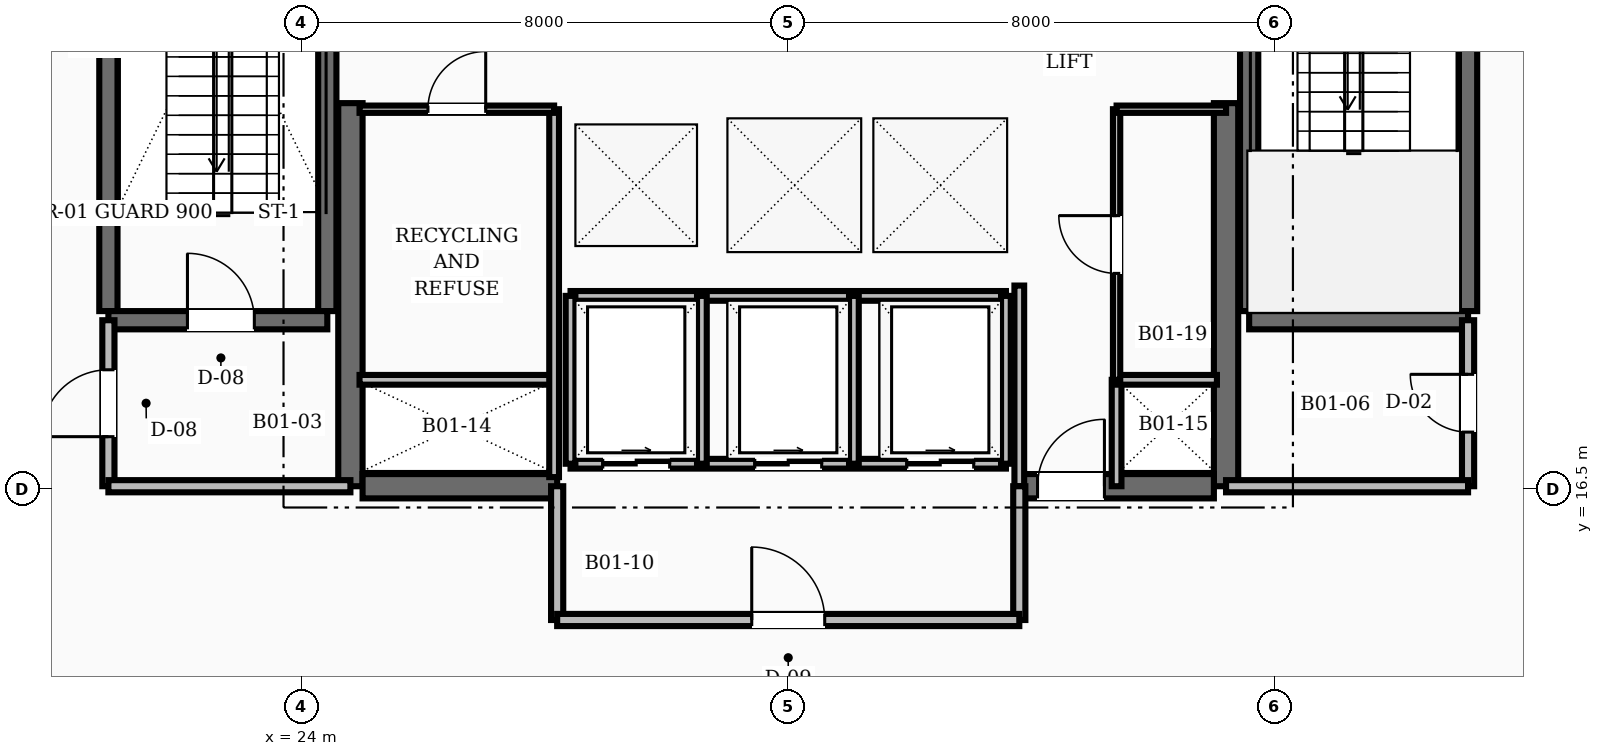
"""IFC4 building model, lengths in metres.
Left out: names, types, materials, properties, quantities, classifications, styles, units other than length and angle.
Written with IfcOpenShell. Run it as: python <this file> out.ifc"""

import sys

from ifc_helpers import new_model, si_unit, direction, frame, frame_2d, origin, place, context, subcontext, project, spatial, rectangle, extrude, element, fill, save


model = new_model("IFC4")
c1 = context("Model", 3, precision=1e-05, world=origin(), true_north=direction((0.0, 1.0)))
c2 = subcontext(c1, "Body", "Model", "MODEL_VIEW")
j1 = project(units=[si_unit("LENGTHUNIT", "METRE"), si_unit("PLANEANGLEUNIT", "RADIAN")], contexts=[c1])
p1 = place(None, origin())
s1 = spatial("IfcSite", under=j1, at=p1, CompositionType="ELEMENT")
p2 = place(p1, origin())
s2 = spatial("IfcBuilding", under=s1, at=p2, CompositionType="ELEMENT")
p3 = place(p2, frame((0.0, 0.0, -5.2)))
s3 = spatial("IfcBuildingStorey", under=s2, at=p3, CompositionType="ELEMENT", Elevation=-5.2)
for number, where, z_axis, x_axis in (
    (1, (24.8, 16.55, 0.0), (0.0, 0.0, 1.0), (0.0, 1.0, 0.0)),
    (2, (39.2, 16.55, 0.0), (0.0, 0.0, 1.0), (0.0, 1.0, 0.0)),
):
    element("IfcWall", number, at=place(p3, frame(where, z_axis=z_axis, x_axis=x_axis)), inside=s3, PredefinedType="SHEAR", context=c2, shape_type="SweptSolid", body=[
        extrude(rectangle(XDim=6.3, YDim=0.4, at=frame_2d((3.15, 0.0))), origin(), (0.0, 0.0, 1.0), 5.2),
    ])
p4 = place(p3, frame((25.0, 16.55, 0.0), z_axis=(0.0, 0.0, 1.0), x_axis=(1.0, 0.0, 0.0)))
e3 = element("IfcWall", 3, at=p4, inside=s3, PredefinedType="SHEAR", context=c2, shape_type="SweptSolid", body=[
    extrude(rectangle(XDim=3.2, YDim=0.4, at=frame_2d((1.6, 0.0))), origin(), (0.0, 0.0, 1.0), 5.2),
])
p5 = place(p3, frame((35.8, 16.55, 0.0), z_axis=(0.0, 0.0, 1.0), x_axis=(1.0, 0.0, 0.0)))
e4 = element("IfcWall", 4, at=p5, inside=s3, PredefinedType="SHEAR", context=c2, shape_type="SweptSolid", body=[
    extrude(rectangle(XDim=3.2, YDim=0.4, at=frame_2d((1.6, 0.0))), origin(), (0.0, 0.0, 1.0), 5.2),
])
p6 = place(p5, frame((0.3, 0.0, 0.0)))
e5 = element("IfcOpeningElement", 5, at=p6, cuts=e4, PredefinedType="OPENING", context=c2, shape_type="SweptSolid", body=[
    extrude(rectangle(XDim=1.1, YDim=2.1, at=frame_2d((0.55, 1.05))), frame((0.0, 0.21, 0.0), z_axis=(0.0, -1.0, 0.0), x_axis=(1.0, 0.0, 0.0)), (0.0, 0.0, 1.0), 0.42),
])
for number, where, z_axis, x_axis in (
    (6, (20.82, 19.43, 0.0), (0.0, 0.0, 1.0), (0.0, 1.0, 0.0)),
    (7, (24.42, 19.43, 0.0), (0.0, 0.0, 1.0), (0.0, 1.0, 0.0)),
):
    element("IfcWall", number, at=place(p3, frame(where, z_axis=z_axis, x_axis=x_axis)), inside=s3, PredefinedType="SHEAR", context=c2, shape_type="SweptSolid", body=[
        extrude(rectangle(XDim=8.74, YDim=0.3, at=frame_2d((4.37, 0.0))), origin(), (0.0, 0.0, 1.0), 5.2),
    ])
p7 = place(p3, frame((20.82, 19.28, 0.0), z_axis=(0.0, 0.0, 1.0), x_axis=(1.0, 0.0, 0.0)))
e8 = element("IfcWall", 8, at=p7, inside=s3, PredefinedType="SHEAR", context=c2, shape_type="SweptSolid", body=[
    extrude(rectangle(XDim=3.6, YDim=0.3, at=frame_2d((1.8, 0.0))), origin(), (0.0, 0.0, 1.0), 5.2),
])
p8 = place(p7, frame((1.3, 0.0, 0.0)))
e9 = element("IfcOpeningElement", 9, at=p8, cuts=e8, PredefinedType="OPENING", context=c2, shape_type="SweptSolid", body=[
    extrude(rectangle(XDim=1.1, YDim=2.1, at=frame_2d((0.55, 1.05))), frame((0.0, 0.16, 0.0), z_axis=(0.0, -1.0, 0.0), x_axis=(1.0, 0.0, 0.0)), (0.0, 0.0, 1.0), 0.32),
])
for number, where, z_axis, x_axis in (
    (10, (43.18, 19.43, 0.0), (0.0, 0.0, 1.0), (0.0, 1.0, 0.0)),
    (11, (39.58, 19.43, 0.0), (0.0, 0.0, 1.0), (0.0, 1.0, 0.0)),
):
    element("IfcWall", number, at=place(p3, frame(where, z_axis=z_axis, x_axis=x_axis)), inside=s3, PredefinedType="SHEAR", context=c2, shape_type="SweptSolid", body=[
        extrude(rectangle(XDim=8.74, YDim=0.3, at=frame_2d((4.37, 0.0))), origin(), (0.0, 0.0, 1.0), 5.2),
    ])
p9 = place(p3, frame((39.58, 19.28, 0.0), z_axis=(0.0, 0.0, 1.0), x_axis=(1.0, 0.0, 0.0)))
e12 = element("IfcWall", 12, at=p9, inside=s3, PredefinedType="SHEAR", context=c2, shape_type="SweptSolid", body=[
    extrude(rectangle(XDim=3.6, YDim=0.3, at=frame_2d((1.8, 0.0))), origin(), (0.0, 0.0, 1.0), 5.2),
])
p10 = place(p3, frame((20.82, 16.55, 0.0), z_axis=(0.0, 0.0, 1.0), x_axis=(0.0, 1.0, 0.0)))
e13 = element("IfcWall", 13, at=p10, inside=s3, PredefinedType="SOLIDWALL", context=c2, shape_type="SweptSolid", body=[
    extrude(rectangle(XDim=2.73, YDim=0.2, at=frame_2d((1.365, 0.0))), origin(), (0.0, 0.0, 1.0), 3.92),
])
p11 = place(p10, frame((0.815, 0.0, 0.0)))
e14 = element("IfcOpeningElement", 14, at=p11, cuts=e13, PredefinedType="OPENING", context=c2, shape_type="SweptSolid", body=[
    extrude(rectangle(XDim=1.1, YDim=2.1, at=frame_2d((0.55, 1.05))), frame((0.0, 0.11, 0.0), z_axis=(0.0, -1.0, 0.0), x_axis=(1.0, 0.0, 0.0)), (0.0, 0.0, 1.0), 0.22),
])
p12 = place(p3, frame((20.82, 16.55, 0.0), z_axis=(0.0, 0.0, 1.0), x_axis=(1.0, 0.0, 0.0)))
e15 = element("IfcWall", 15, at=p12, inside=s3, PredefinedType="SOLIDWALL", context=c2, shape_type="SweptSolid", body=[
    extrude(rectangle(XDim=3.98, YDim=0.2, at=frame_2d((1.99, 0.0))), origin(), (0.0, 0.0, 1.0), 3.92),
])
p13 = place(p3, frame((43.18, 16.55, 0.0), z_axis=(0.0, 0.0, 1.0), x_axis=(0.0, 1.0, 0.0)))
e16 = element("IfcWall", 16, at=p13, inside=s3, PredefinedType="SOLIDWALL", context=c2, shape_type="SweptSolid", body=[
    extrude(rectangle(XDim=2.73, YDim=0.2, at=frame_2d((1.365, 0.0))), origin(), (0.0, 0.0, 1.0), 3.92),
])
p14 = place(p13, frame((0.89, 0.0, 0.0)))
e17 = element("IfcOpeningElement", 17, at=p14, cuts=e16, PredefinedType="OPENING", context=c2, shape_type="SweptSolid", body=[
    extrude(rectangle(XDim=0.95, YDim=2.1, at=frame_2d((0.475, 1.05))), frame((0.0, 0.11, 0.0), z_axis=(0.0, -1.0, 0.0), x_axis=(1.0, 0.0, 0.0)), (0.0, 0.0, 1.0), 0.22),
])
p15 = place(p3, frame((39.2, 16.55, 0.0), z_axis=(0.0, 0.0, 1.0), x_axis=(1.0, 0.0, 0.0)))
e18 = element("IfcWall", 18, at=p15, inside=s3, PredefinedType="SOLIDWALL", context=c2, shape_type="SweptSolid", body=[
    extrude(rectangle(XDim=3.98, YDim=0.2, at=frame_2d((1.99, 0.0))), origin(), (0.0, 0.0, 1.0), 3.92),
])
p16 = place(p3, frame((35.8, 16.55, 0.0), z_axis=(0.0, 0.0, 1.0), x_axis=(0.0, 1.0, 0.0)))
e19 = element("IfcWall", 19, at=p16, inside=s3, PredefinedType="SOLIDWALL", context=c2, shape_type="SweptSolid", body=[
    extrude(rectangle(XDim=3.3, YDim=0.16, at=frame_2d((1.65, 0.0))), origin(), (0.0, 0.0, 1.0), 3.92),
])
p17 = place(p3, frame((37.4, 16.55, 0.0), z_axis=(0.0, 0.0, 1.0), x_axis=(0.0, 1.0, 0.0)))
e20 = element("IfcWall", 20, at=p17, inside=s3, PredefinedType="SOLIDWALL", context=c2, shape_type="SweptSolid", body=[
    extrude(rectangle(XDim=1.75, YDim=0.16, at=frame_2d((0.875, 0.0))), origin(), (0.0, 0.0, 1.0), 3.92),
])
for number, where, z_axis, x_axis in (
    (21, (28.2, 14.35, 0.0), (0.0, 0.0, 1.0), (0.0, 1.0, 0.0)),
    (22, (35.8, 14.35, 0.0), (0.0, 0.0, 1.0), (0.0, 1.0, 0.0)),
):
    element("IfcWall", number, at=place(p3, frame(where, z_axis=z_axis, x_axis=x_axis)), inside=s3, PredefinedType="SOLIDWALL", context=c2, shape_type="SweptSolid", body=[
        extrude(rectangle(XDim=2.2, YDim=0.2, at=frame_2d((1.1, 0.0))), origin(), (0.0, 0.0, 1.0), 3.92),
    ])
p18 = place(p3, frame((28.2, 14.35, 0.0), z_axis=(0.0, 0.0, 1.0), x_axis=(1.0, 0.0, 0.0)))
e23 = element("IfcWall", 23, at=p18, inside=s3, PredefinedType="SOLIDWALL", context=c2, shape_type="SweptSolid", body=[
    extrude(rectangle(XDim=7.6, YDim=0.2, at=frame_2d((3.8, 0.0))), origin(), (0.0, 0.0, 1.0), 3.92),
])
p19 = place(p18, frame((3.2, 0.0, 0.0)))
e24 = element("IfcOpeningElement", 24, at=p19, cuts=e23, PredefinedType="OPENING", context=c2, shape_type="SweptSolid", body=[
    extrude(rectangle(XDim=1.2, YDim=2.1, at=frame_2d((0.6, 1.05))), frame((0.0, 0.11, 0.0), z_axis=(0.0, -1.0, 0.0), x_axis=(1.0, 0.0, 0.0)), (0.0, 0.0, 1.0), 0.22),
])
p20 = place(p3, frame((28.42, 16.92, 0.0), z_axis=(0.0, 0.0, 1.0), x_axis=(1.0, 0.0, 0.0)))
e25 = element("IfcWall", 25, at=p20, inside=s3, PredefinedType="SOLIDWALL", context=c2, shape_type="SweptSolid", body=[
    extrude(rectangle(XDim=7.16, YDim=0.16, at=frame_2d((3.58, 0.0))), origin(), (0.0, 0.0, 1.0), 3.92),
])
p21 = place(p20, frame((0.53, 0.0, 0.0)))
e26 = element("IfcOpeningElement", 26, at=p21, cuts=e25, PredefinedType="OPENING", context=c2, shape_type="SweptSolid", body=[
    extrude(rectangle(XDim=1.1, YDim=2.15, at=frame_2d((0.55, 1.075))), frame((0.0, 0.09, 0.0), z_axis=(0.0, -1.0, 0.0), x_axis=(1.0, 0.0, 0.0)), (0.0, 0.0, 1.0), 0.18),
])
p22 = place(p20, frame((3.03, 0.0, 0.0)))
e27 = element("IfcOpeningElement", 27, at=p22, cuts=e25, PredefinedType="OPENING", context=c2, shape_type="SweptSolid", body=[
    extrude(rectangle(XDim=1.1, YDim=2.15, at=frame_2d((0.55, 1.075))), frame((0.0, 0.09, 0.0), z_axis=(0.0, -1.0, 0.0), x_axis=(1.0, 0.0, 0.0)), (0.0, 0.0, 1.0), 0.18),
])
p23 = place(p20, frame((5.53, 0.0, 0.0)))
e28 = element("IfcOpeningElement", 28, at=p23, cuts=e25, PredefinedType="OPENING", context=c2, shape_type="SweptSolid", body=[
    extrude(rectangle(XDim=1.1, YDim=2.15, at=frame_2d((0.55, 1.075))), frame((0.0, 0.09, 0.0), z_axis=(0.0, -1.0, 0.0), x_axis=(1.0, 0.0, 0.0)), (0.0, 0.0, 1.0), 0.18),
])
p24 = place(p3, frame((28.42, 19.68, 0.0), z_axis=(0.0, 0.0, 1.0), x_axis=(1.0, 0.0, 0.0)))
e29 = element("IfcWall", 29, at=p24, inside=s3, PredefinedType="SOLIDWALL", context=c2, shape_type="SweptSolid", body=[
    extrude(rectangle(XDim=7.16, YDim=0.16, at=frame_2d((3.58, 0.0))), origin(), (0.0, 0.0, 1.0), 3.92),
])
for number, where, z_axis, x_axis in (
    (30, (28.42, 16.92, 0.0), (0.0, 0.0, 1.0), (0.0, 1.0, 0.0)),
    (31, (30.58, 16.92, 0.0), (0.0, 0.0, 1.0), (0.0, 1.0, 0.0)),
    (32, (33.08, 16.92, 0.0), (0.0, 0.0, 1.0), (0.0, 1.0, 0.0)),
    (33, (35.58, 16.92, 0.0), (0.0, 0.0, 1.0), (0.0, 1.0, 0.0)),
):
    element("IfcWall", number, at=place(p3, frame(where, z_axis=z_axis, x_axis=x_axis)), inside=s3, PredefinedType="SOLIDWALL", context=c2, shape_type="SweptSolid", body=[
        extrude(rectangle(XDim=2.76, YDim=0.16, at=frame_2d((1.38, 0.0))), origin(), (0.0, 0.0, 1.0), 3.92),
    ])
p25 = place(p3, frame((24.95, 18.3, 0.0), z_axis=(0.0, 0.0, 1.0), x_axis=(1.0, 0.0, 0.0)))
e34 = element("IfcWall", 34, at=p25, inside=s3, PredefinedType="SOLIDWALL", context=c2, shape_type="SweptSolid", body=[
    extrude(rectangle(XDim=3.2, YDim=0.16, at=frame_2d((1.6, 0.0))), origin(), (0.0, 0.0, 1.0), 3.92),
])
p26 = place(p3, frame((28.15, 16.7, 0.0), z_axis=(0.0, 0.0, 1.0), x_axis=(0.0, 1.0, 0.0)))
e35 = element("IfcWall", 35, at=p26, inside=s3, PredefinedType="SOLIDWALL", context=c2, shape_type="SweptSolid", body=[
    extrude(rectangle(XDim=6.05, YDim=0.16, at=frame_2d((3.025, 0.0))), origin(), (0.0, 0.0, 1.0), 3.92),
])
p27 = place(p3, frame((37.4, 18.3, 0.0), z_axis=(0.0, 0.0, 1.0), x_axis=(1.0, 0.0, 0.0)))
e36 = element("IfcWall", 36, at=p27, inside=s3, PredefinedType="SOLIDWALL", context=c2, shape_type="SweptSolid", body=[
    extrude(rectangle(XDim=1.65, YDim=0.16, at=frame_2d((0.825, 0.0))), origin(), (0.0, 0.0, 1.0), 3.92),
])
p28 = place(p3, frame((24.95, 22.75, 0.0), z_axis=(0.0, 0.0, 1.0), x_axis=(1.0, 0.0, 0.0)))
e37 = element("IfcWall", 37, at=p28, inside=s3, PredefinedType="PARTITIONING", context=c2, shape_type="SweptSolid", body=[
    extrude(rectangle(XDim=3.2, YDim=0.12, at=frame_2d((1.6, 0.0))), origin(), (0.0, 0.0, 1.0), 3.92),
])
p29 = place(p28, frame((1.125, 0.0, 0.0)))
e38 = element("IfcOpeningElement", 38, at=p29, cuts=e37, PredefinedType="OPENING", context=c2, shape_type="SweptSolid", body=[
    extrude(rectangle(XDim=0.95, YDim=2.1, at=frame_2d((0.475, 1.05))), frame((0.0, 0.07, 0.0), z_axis=(0.0, -1.0, 0.0), x_axis=(1.0, 0.0, 0.0)), (0.0, 0.0, 1.0), 0.14),
])
p30 = place(p3, frame((37.4, 18.3, 0.0), z_axis=(0.0, 0.0, 1.0), x_axis=(0.0, 1.0, 0.0)))
e39 = element("IfcWall", 39, at=p30, inside=s3, PredefinedType="PARTITIONING", context=c2, shape_type="SweptSolid", body=[
    extrude(rectangle(XDim=4.45, YDim=0.12, at=frame_2d((2.225, 0.0))), origin(), (0.0, 0.0, 1.0), 3.92),
])
p31 = place(p30, frame((1.75, 0.0, 0.0)))
e40 = element("IfcOpeningElement", 40, at=p31, cuts=e39, PredefinedType="OPENING", context=c2, shape_type="SweptSolid", body=[
    extrude(rectangle(XDim=0.95, YDim=2.1, at=frame_2d((0.475, 1.05))), frame((0.0, 0.07, 0.0), z_axis=(0.0, -1.0, 0.0), x_axis=(1.0, 0.0, 0.0)), (0.0, 0.0, 1.0), 0.14),
])
p32 = place(p3, frame((37.4, 22.75, 0.0), z_axis=(0.0, 0.0, 1.0), x_axis=(1.0, 0.0, 0.0)))
e41 = element("IfcWall", 41, at=p32, inside=s3, PredefinedType="PARTITIONING", context=c2, shape_type="SweptSolid", body=[
    extrude(rectangle(XDim=1.8, YDim=0.12, at=frame_2d((0.9, 0.0))), origin(), (0.0, 0.0, 1.0), 3.92),
])
p33 = place(p8, origin())
e42 = element("IfcDoor", 42, at=p33, inside=s3, OperationType="SINGLE_SWING_LEFT", PredefinedType="DOOR", context=c2, shape_type="SweptSolid", body=[
    extrude(rectangle(XDim=1.1, YDim=2.1, at=frame_2d((0.55, 1.05))), frame((0.0, 0.025, 0.0), z_axis=(0.0, -1.0, 0.0), x_axis=(1.0, 0.0, 0.0)), (0.0, 0.0, 1.0), 0.05),
])
fill(e9, e42)
p34 = place(p11, origin())
e43 = element("IfcDoor", 43, at=p34, inside=s3, OperationType="SINGLE_SWING_LEFT", PredefinedType="DOOR", context=c2, shape_type="SweptSolid", body=[
    extrude(rectangle(XDim=1.1, YDim=2.1, at=frame_2d((0.55, 1.05))), frame((0.0, 0.025, 0.0), z_axis=(0.0, -1.0, 0.0), x_axis=(1.0, 0.0, 0.0)), (0.0, 0.0, 1.0), 0.05),
])
fill(e14, e43)
p35 = place(p14, origin())
e44 = element("IfcDoor", 44, at=p35, inside=s3, OperationType="SINGLE_SWING_RIGHT", PredefinedType="DOOR", context=c2, shape_type="SweptSolid", body=[
    extrude(rectangle(XDim=0.95, YDim=2.1, at=frame_2d((0.475, 1.05))), frame((0.0, 0.025, 0.0), z_axis=(0.0, -1.0, 0.0), x_axis=(1.0, 0.0, 0.0)), (0.0, 0.0, 1.0), 0.05),
])
fill(e17, e44)
p36 = place(p6, origin())
e45 = element("IfcDoor", 45, at=p36, inside=s3, OperationType="SINGLE_SWING_RIGHT", PredefinedType="DOOR", context=c2, shape_type="SweptSolid", body=[
    extrude(rectangle(XDim=1.1, YDim=2.1, at=frame_2d((0.55, 1.05))), frame((0.0, 0.025, 0.0), z_axis=(0.0, -1.0, 0.0), x_axis=(1.0, 0.0, 0.0)), (0.0, 0.0, 1.0), 0.05),
])
fill(e5, e45)
p37 = place(p19, origin())
e46 = element("IfcDoor", 46, at=p37, inside=s3, OperationType="SINGLE_SWING_LEFT", PredefinedType="DOOR", context=c2, shape_type="SweptSolid", body=[
    extrude(rectangle(XDim=1.2, YDim=2.1, at=frame_2d((0.6, 1.05))), frame((0.0, 0.025, 0.0), z_axis=(0.0, -1.0, 0.0), x_axis=(1.0, 0.0, 0.0)), (0.0, 0.0, 1.0), 0.05),
])
fill(e24, e46)
p38 = place(p21, origin())
e47 = element("IfcDoor", 47, at=p38, inside=s3, OperationType="SLIDING_TO_RIGHT", PredefinedType="DOOR", context=c2, shape_type="SweptSolid", body=[
    extrude(rectangle(XDim=1.1, YDim=2.15, at=frame_2d((0.55, 1.075))), frame((0.0, 0.025, 0.0), z_axis=(0.0, -1.0, 0.0), x_axis=(1.0, 0.0, 0.0)), (0.0, 0.0, 1.0), 0.05),
])
fill(e26, e47)
p39 = place(p22, origin())
e48 = element("IfcDoor", 48, at=p39, inside=s3, OperationType="SLIDING_TO_RIGHT", PredefinedType="DOOR", context=c2, shape_type="SweptSolid", body=[
    extrude(rectangle(XDim=1.1, YDim=2.15, at=frame_2d((0.55, 1.075))), frame((0.0, 0.025, 0.0), z_axis=(0.0, -1.0, 0.0), x_axis=(1.0, 0.0, 0.0)), (0.0, 0.0, 1.0), 0.05),
])
fill(e27, e48)
p40 = place(p23, origin())
e49 = element("IfcDoor", 49, at=p40, inside=s3, OperationType="SLIDING_TO_RIGHT", PredefinedType="DOOR", context=c2, shape_type="SweptSolid", body=[
    extrude(rectangle(XDim=1.1, YDim=2.15, at=frame_2d((0.55, 1.075))), frame((0.0, 0.025, 0.0), z_axis=(0.0, -1.0, 0.0), x_axis=(1.0, 0.0, 0.0)), (0.0, 0.0, 1.0), 0.05),
])
fill(e28, e49)
p41 = place(p29, origin())
e50 = element("IfcDoor", 50, at=p41, inside=s3, OperationType="SINGLE_SWING_RIGHT", PredefinedType="DOOR", context=c2, shape_type="SweptSolid", body=[
    extrude(rectangle(XDim=0.95, YDim=2.1, at=frame_2d((0.475, 1.05))), frame((0.0, 0.025, 0.0), z_axis=(0.0, -1.0, 0.0), x_axis=(1.0, 0.0, 0.0)), (0.0, 0.0, 1.0), 0.05),
])
fill(e38, e50)
p42 = place(p31, origin())
e51 = element("IfcDoor", 51, at=p42, inside=s3, OperationType="SINGLE_SWING_RIGHT", PredefinedType="DOOR", context=c2, shape_type="SweptSolid", body=[
    extrude(rectangle(XDim=0.95, YDim=2.1, at=frame_2d((0.475, 1.05))), frame((0.0, 0.025, 0.0), z_axis=(0.0, -1.0, 0.0), x_axis=(1.0, 0.0, 0.0)), (0.0, 0.0, 1.0), 0.05),
])
fill(e40, e51)
save(model, sys.argv[1])
